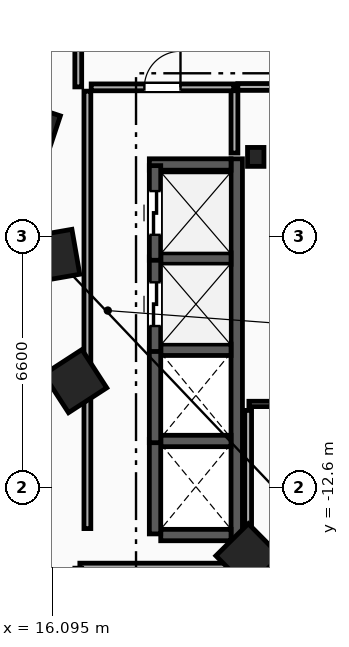
"""IFC4 building model, lengths in metres.
Left out: names, types, materials, properties, quantities, classifications, styles, units other than length and angle.
Written with IfcOpenShell. Run it as: python <this file> out.ifc"""

import sys

from ifc_helpers import new_model, si_unit, direction, frame, frame_2d, origin, origin_2d, place, context, subcontext, project, spatial, rectangle, i_section, extrude, element, fill, save


model = new_model("IFC4")
c1 = context("Model", 3, precision=1e-05, world=origin(), true_north=direction((0.0, 1.0)))
c2 = subcontext(c1, "Body", "Model", "MODEL_VIEW")
j1 = project(units=[si_unit("LENGTHUNIT", "METRE"), si_unit("PLANEANGLEUNIT", "RADIAN")], contexts=[c1])
p1 = place(None, origin())
s1 = spatial("IfcSite", under=j1, at=p1, CompositionType="ELEMENT")
p2 = place(p1, origin())
s2 = spatial("IfcBuilding", under=s1, at=p2, CompositionType="ELEMENT")
p3 = place(p2, frame((0.0, 0.0, 73.4)))
s3 = spatial("IfcBuildingStorey", under=s2, at=p3, CompositionType="ELEMENT", Elevation=73.4)
p4 = place(p3, frame((21.45, -3.9, 0.0), z_axis=(0.0, 0.0, 1.0), x_axis=(1.0, 0.0, 0.0)))
e1 = element("IfcColumn", 1, at=p4, inside=s3, PredefinedType="COLUMN", context=c2, shape_type="SweptSolid", body=[
    extrude(i_section(OverallWidth=0.432, OverallDepth=0.498, WebThickness=0.056, FlangeThickness=0.089, FilletRadius=0.018, at=origin_2d()), origin(), (0.0, 0.0, 1.0), 3.8),
])
for number, where, z_axis, x_axis in (
    (2, (15.55, -3.2, 0.0), (0.0, 0.0, 1.0), (-0.315, -0.949, 0.0)),
    (3, (16.125, -6.5, 0.0), (0.0, 0.0, 1.0), (0.172, -0.985, 0.0)),
    (4, (16.7, -9.8, 0.0), (0.0, 0.0, 1.0), (0.544, -0.839, 0.0)),
    (5, (21.25, -14.4, 0.0), (0.0, 0.0, 1.0), (0.703, -0.711, 0.0)),
):
    element("IfcColumn", number, at=place(p3, frame(where, z_axis=z_axis, x_axis=x_axis)), inside=s3, PredefinedType="COLUMN", context=c2, shape_type="SweptSolid", body=[
        extrude(rectangle(XDim=1.2, YDim=1.2, at=origin_2d()), origin(), (0.0, 0.0, 1.0), 3.8),
    ])
p5 = place(p3, frame((20.89, -3.8, 0.0), z_axis=(0.0, 0.0, 1.0), x_axis=(0.0, 1.0, 0.0)))
e6 = element("IfcWall", 6, at=p5, inside=s3, PredefinedType="PARTITIONING", context=c2, shape_type="SweptSolid", body=[
    extrude(rectangle(XDim=1.65, YDim=0.18, at=frame_2d((0.825, 0.0))), origin(), (0.0, 0.0, 1.0), 3.52),
])
p6 = place(p3, frame((20.98, -2.06, 0.0), z_axis=(0.0, 0.0, 1.0), x_axis=(1.0, 0.0, 0.0)))
e7 = element("IfcWall", 7, at=p6, inside=s3, PredefinedType="PARTITIONING", context=c2, shape_type="SweptSolid", body=[
    extrude(rectangle(XDim=3.0, YDim=0.18, at=frame_2d((1.5, 0.0))), origin(), (0.0, 0.0, 1.0), 3.52),
])
p7 = place(p6, frame((0.9, 0.0, 0.0)))
e8 = element("IfcOpeningElement", 8, at=p7, cuts=e7, PredefinedType="OPENING", context=c2, shape_type="SweptSolid", body=[
    extrude(rectangle(XDim=1.2, YDim=2.15, at=frame_2d((0.6, 1.075))), frame((0.0, 0.1, 0.0), z_axis=(0.0, -1.0, 0.0), x_axis=(1.0, 0.0, 0.0)), (0.0, 0.0, 1.0), 0.2),
])
p8 = place(p3, frame((20.95, -14.0, 0.0), z_axis=(0.0, 0.0, 1.0), x_axis=(0.0, 1.0, 0.0)))
e9 = element("IfcWall", 9, at=p8, inside=s3, PredefinedType="SHEAR", context=c2, shape_type="SweptSolid", body=[
    extrude(rectangle(XDim=10.05, YDim=0.3, at=frame_2d((5.025, 0.0))), origin(), (0.0, 0.0, 1.0), 3.52),
])
p9 = place(p3, frame((18.95, -13.85, 0.0), z_axis=(0.0, 0.0, 1.0), x_axis=(1.0, 0.0, 0.0)))
e10 = element("IfcWall", 10, at=p9, inside=s3, PredefinedType="SHEAR", context=c2, shape_type="SweptSolid", body=[
    extrude(rectangle(XDim=1.85, YDim=0.3, at=frame_2d((0.925, 0.0))), origin(), (0.0, 0.0, 1.0), 3.52),
])
p10 = place(p3, frame((18.65, -4.1, 0.0), z_axis=(0.0, 0.0, 1.0), x_axis=(1.0, 0.0, 0.0)))
e11 = element("IfcWall", 11, at=p10, inside=s3, PredefinedType="SHEAR", context=c2, shape_type="SweptSolid", body=[
    extrude(rectangle(XDim=2.15, YDim=0.3, at=frame_2d((1.075, 0.0))), origin(), (0.0, 0.0, 1.0), 3.52),
])
for number, where, z_axis, x_axis in (
    (12, (18.95, -11.375, 0.0), (0.0, 0.0, 1.0), (1.0, 0.0, 0.0)),
    (13, (18.95, -8.975, 0.0), (0.0, 0.0, 1.0), (1.0, 0.0, 0.0)),
    (14, (18.95, -6.575, 0.0), (0.0, 0.0, 1.0), (1.0, 0.0, 0.0)),
):
    element("IfcWall", number, at=place(p3, frame(where, z_axis=z_axis, x_axis=x_axis)), inside=s3, PredefinedType="SHEAR", context=c2, shape_type="SweptSolid", body=[
        extrude(rectangle(XDim=1.85, YDim=0.3, at=frame_2d((0.925, 0.0))), origin(), (0.0, 0.0, 1.0), 3.52),
    ])
for number, where, z_axis, x_axis in (
    (15, (18.8, -13.82, 0.0), (0.0, 0.0, 1.0), (0.0, 1.0, 0.0)),
    (16, (18.8, -11.42, 0.0), (0.0, 0.0, 1.0), (0.0, 1.0, 0.0)),
):
    element("IfcWall", number, at=place(p3, frame(where, z_axis=z_axis, x_axis=x_axis)), inside=s3, PredefinedType="SHEAR", context=c2, shape_type="SweptSolid", body=[
        extrude(rectangle(XDim=2.49, YDim=0.3, at=frame_2d((1.245, 0.0))), origin(), (0.0, 0.0, 1.0), 3.52),
    ])
p11 = place(p3, frame((18.8, -9.02, 0.0), z_axis=(0.0, 0.0, 1.0), x_axis=(0.0, 1.0, 0.0)))
e17 = element("IfcWall", 17, at=p11, inside=s3, PredefinedType="SHEAR", context=c2, shape_type="SweptSolid", body=[
    extrude(rectangle(XDim=2.49, YDim=0.3, at=frame_2d((1.245, 0.0))), origin(), (0.0, 0.0, 1.0), 3.52),
])
p12 = place(p11, frame((0.67, 0.0, 0.0)))
e18 = element("IfcOpeningElement", 18, at=p12, cuts=e17, PredefinedType="OPENING", context=c2, shape_type="SweptSolid", body=[
    extrude(rectangle(XDim=1.15, YDim=2.2, at=frame_2d((0.575, 1.1))), frame((0.0, 0.16, 0.0), z_axis=(0.0, -1.0, 0.0), x_axis=(1.0, 0.0, 0.0)), (0.0, 0.0, 1.0), 0.32),
])
p13 = place(p3, frame((18.8, -6.62, 0.0), z_axis=(0.0, 0.0, 1.0), x_axis=(0.0, 1.0, 0.0)))
e19 = element("IfcWall", 19, at=p13, inside=s3, PredefinedType="SHEAR", context=c2, shape_type="SweptSolid", body=[
    extrude(rectangle(XDim=2.49, YDim=0.3, at=frame_2d((1.245, 0.0))), origin(), (0.0, 0.0, 1.0), 3.52),
])
p14 = place(p13, frame((0.67, 0.0, 0.0)))
e20 = element("IfcOpeningElement", 20, at=p14, cuts=e19, PredefinedType="OPENING", context=c2, shape_type="SweptSolid", body=[
    extrude(rectangle(XDim=1.15, YDim=2.2, at=frame_2d((0.575, 1.1))), frame((0.0, 0.16, 0.0), z_axis=(0.0, -1.0, 0.0), x_axis=(1.0, 0.0, 0.0)), (0.0, 0.0, 1.0), 0.32),
])
p15 = place(p3, frame((17.02, -13.68, 0.0), z_axis=(0.0, 0.0, 1.0), x_axis=(0.0, 1.0, 0.0)))
e21 = element("IfcWall", 21, at=p15, inside=s3, PredefinedType="PARTITIONING", context=c2, shape_type="SweptSolid", body=[
    extrude(rectangle(XDim=11.51, YDim=0.18, at=frame_2d((5.755, 0.0))), origin(), (0.0, 0.0, 1.0), 3.52),
])
p16 = place(p3, frame((17.12, -2.07, 0.0), z_axis=(0.0, 0.0, 1.0), x_axis=(1.0, 0.0, 0.0)))
e22 = element("IfcWall", 22, at=p16, inside=s3, PredefinedType="PARTITIONING", context=c2, shape_type="SweptSolid", body=[
    extrude(rectangle(XDim=3.75, YDim=0.18, at=frame_2d((1.875, 0.0))), origin(), (0.0, 0.0, 1.0), 3.52),
])
p17 = place(p16, frame((1.4, 0.0, 0.0)))
e23 = element("IfcOpeningElement", 23, at=p17, cuts=e22, PredefinedType="OPENING", context=c2, shape_type="SweptSolid", body=[
    extrude(rectangle(XDim=0.95, YDim=2.1, at=frame_2d((0.475, 1.05))), frame((0.0, 0.1, 0.0), z_axis=(0.0, -1.0, 0.0), x_axis=(1.0, 0.0, 0.0)), (0.0, 0.0, 1.0), 0.2),
])
p18 = place(p3, frame((21.27, -10.4, 0.0), z_axis=(0.0, 0.0, 1.0), x_axis=(1.0, 0.0, 0.0)))
e24 = element("IfcWall", 24, at=p18, inside=s3, PredefinedType="PARTITIONING", context=c2, shape_type="SweptSolid", body=[
    extrude(rectangle(XDim=0.59, YDim=0.14, at=frame_2d((0.295, 0.0))), origin(), (0.0, 0.0, 1.0), 3.52),
])
p19 = place(p3, frame((21.25, -14.93, 0.0), z_axis=(0.0, 0.0, 1.0), x_axis=(0.0, 1.0, 0.0)))
e25 = element("IfcWall", 25, at=p19, inside=s3, PredefinedType="PARTITIONING", context=c2, shape_type="SweptSolid", body=[
    extrude(rectangle(XDim=4.36, YDim=0.18, at=frame_2d((2.18, 0.0))), origin(), (0.0, 0.0, 1.0), 3.52),
])
p20 = place(p3, frame((21.178, -14.68, 0.0), z_axis=(0.0, 0.0, 1.0), x_axis=(-1.0, 0.0, 0.0)))
e26 = element("IfcWall", 26, at=p20, inside=s3, PredefinedType="PARTITIONING", context=c2, shape_type="SweptSolid", body=[
    extrude(rectangle(XDim=4.357, YDim=0.18, at=frame_2d((2.178, 0.0))), origin(), (0.0, 0.0, 1.0), 3.52),
])
p21 = place(p3, frame((16.78, 0.329, 0.0), z_axis=(0.0, 0.0, 1.0), x_axis=(0.0, -1.0, 0.0)))
e27 = element("IfcWall", 27, at=p21, inside=s3, PredefinedType="PARTITIONING", context=c2, shape_type="SweptSolid", body=[
    extrude(rectangle(XDim=2.387, YDim=0.18, at=frame_2d((1.194, 0.0))), origin(), (0.0, 0.0, 1.0), 3.52),
])
p22 = place(p12, origin())
e28 = element("IfcDoor", 28, at=p22, inside=s3, OperationType="SLIDING_TO_LEFT", PredefinedType="TRAPDOOR", context=c2, shape_type="SweptSolid", body=[
    extrude(rectangle(XDim=1.15, YDim=2.2, at=frame_2d((0.575, 1.1))), frame((0.0, 0.025, 0.0), z_axis=(0.0, -1.0, 0.0), x_axis=(1.0, 0.0, 0.0)), (0.0, 0.0, 1.0), 0.05),
])
fill(e18, e28)
p23 = place(p14, origin())
e29 = element("IfcDoor", 29, at=p23, inside=s3, OperationType="SLIDING_TO_LEFT", PredefinedType="TRAPDOOR", context=c2, shape_type="SweptSolid", body=[
    extrude(rectangle(XDim=1.15, YDim=2.2, at=frame_2d((0.575, 1.1))), frame((0.0, 0.025, 0.0), z_axis=(0.0, -1.0, 0.0), x_axis=(1.0, 0.0, 0.0)), (0.0, 0.0, 1.0), 0.05),
])
fill(e20, e29)
p24 = place(p17, origin())
e30 = element("IfcDoor", 30, at=p24, inside=s3, OperationType="SINGLE_SWING_RIGHT", PredefinedType="DOOR", context=c2, shape_type="SweptSolid", body=[
    extrude(rectangle(XDim=0.95, YDim=2.1, at=frame_2d((0.475, 1.05))), frame((0.0, 0.025, 0.0), z_axis=(0.0, -1.0, 0.0), x_axis=(1.0, 0.0, 0.0)), (0.0, 0.0, 1.0), 0.05),
])
fill(e23, e30)
save(model, sys.argv[1])
